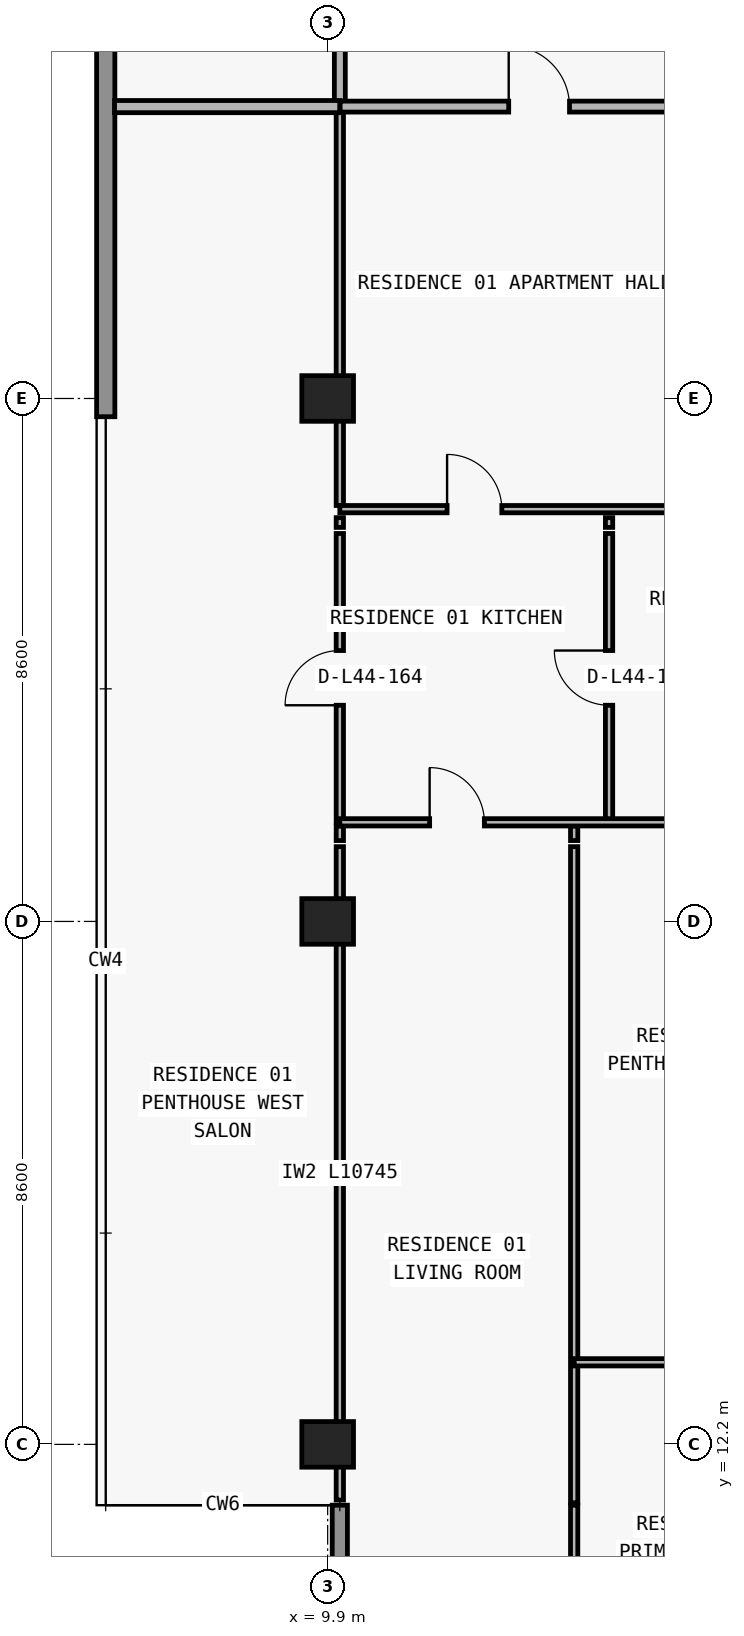
"""IFC4 building model, lengths in metres.
Left out: names, types, materials, properties, quantities, classifications, styles, units other than length and angle.
Written with IfcOpenShell. Run it as: python <this file> out.ifc"""

import sys

from ifc_helpers import new_model, si_unit, direction, frame, frame_2d, origin, origin_2d, place, context, subcontext, project, spatial, rectangle, extrude, element, fill, save


model = new_model("IFC4")
c1 = context("Model", 3, precision=1e-05, world=origin(), true_north=direction((0.0, 1.0)))
c2 = subcontext(c1, "Body", "Model", "MODEL_VIEW")
j1 = project(units=[si_unit("LENGTHUNIT", "METRE"), si_unit("PLANEANGLEUNIT", "RADIAN")], contexts=[c1])
p1 = place(None, origin())
s1 = spatial("IfcSite", under=j1, at=p1, CompositionType="ELEMENT")
p2 = place(p1, origin())
s2 = spatial("IfcBuilding", under=s1, at=p2, CompositionType="ELEMENT")
p3 = place(p2, frame((0.0, 0.0, 160.5)))
s3 = spatial("IfcBuildingStorey", under=s2, at=p3, CompositionType="ELEMENT", Elevation=160.5)
for number, where, z_axis, x_axis in (
    (1, (9.9, 12.2, 0.0), (0.0, 0.0, 1.0), (1.0, 0.0, 0.0)),
    (2, (9.9, 20.8, 0.0), (0.0, 0.0, 1.0), (1.0, 0.0, 0.0)),
    (3, (9.9, 29.4, 0.0), (0.0, 0.0, 1.0), (1.0, 0.0, 0.0)),
):
    element("IfcColumn", number, at=place(p3, frame(where, z_axis=z_axis, x_axis=x_axis)), inside=s3, PredefinedType="COLUMN", context=c2, shape_type="SweptSolid", body=[
        extrude(rectangle(XDim=0.85, YDim=0.75, at=origin_2d()), origin(), (0.0, 0.0, 1.0), 3.05),
    ])
p4 = place(p3, frame((10.1, 11.2, 0.0), z_axis=(0.0, 0.0, 1.0), x_axis=(0.0, -1.0, 0.0)))
e4 = element("IfcWall", 4, at=p4, inside=s3, PredefinedType="ELEMENTEDWALL", context=c2, shape_type="SweptSolid", body=[
    extrude(rectangle(XDim=3.45, YDim=0.25, at=frame_2d((1.725, 0.0))), origin(), (0.0, 0.0, 1.0), 3.05),
])
p5 = place(p3, frame((6.25, 29.1, 0.0), z_axis=(0.0, 0.0, 1.0), x_axis=(0.0, 1.0, 0.0)))
e5 = element("IfcWall", 5, at=p5, inside=s3, PredefinedType="STANDARD", context=c2, shape_type="SweptSolid", body=[
    extrude(rectangle(XDim=17.9, YDim=0.3, at=frame_2d((8.95, 0.0))), origin(), (0.0, 0.0, 1.0), 3.05),
])
p6 = place(p3, frame((10.1, 11.285, 0.0), z_axis=(0.0, 0.0, 1.0), x_axis=(0.0, 1.0, 0.0)))
e6 = element("IfcWall", 6, at=p6, inside=s3, PredefinedType="PARTITIONING", context=c2, shape_type="SweptSolid", body=[
    extrude(rectangle(XDim=10.745, YDim=0.12, at=frame_2d((5.373, 0.0))), origin(), (0.0, 0.0, 1.0), 2.263),
])
p7 = place(p3, frame((10.1, 22.13, 0.0), z_axis=(0.0, 0.0, 1.0), x_axis=(0.0, 1.0, 0.0)))
e7 = element("IfcWall", 7, at=p7, inside=s3, PredefinedType="PARTITIONING", context=c2, shape_type="SweptSolid", body=[
    extrude(rectangle(XDim=0.24, YDim=0.12, at=frame_2d((0.12, 0.0))), origin(), (0.0, 0.0, 1.0), 2.263),
])
p8 = place(p3, frame((10.1, 22.43, 0.0), z_axis=(0.0, 0.0, 1.0), x_axis=(0.0, 1.0, 0.0)))
e8 = element("IfcWall", 8, at=p8, inside=s3, PredefinedType="PARTITIONING", context=c2, shape_type="SweptSolid", body=[
    extrude(rectangle(XDim=4.75, YDim=0.12, at=frame_2d((2.375, 0.0))), origin(), (0.0, 0.0, 1.0), 2.263),
])
p9 = place(p8, frame((1.925, 0.0, 0.0)))
e9 = element("IfcOpeningElement", 9, at=p9, cuts=e8, PredefinedType="OPENING", context=c2, shape_type="SweptSolid", body=[
    extrude(rectangle(XDim=0.9, YDim=2.15, at=frame_2d((0.45, 1.075))), frame((0.0, 0.07, 0.0), z_axis=(0.0, -1.0, 0.0), x_axis=(1.0, 0.0, 0.0)), (0.0, 0.0, 1.0), 0.14),
])
p10 = place(p3, frame((10.1, 27.28, 0.0), z_axis=(0.0, 0.0, 1.0), x_axis=(0.0, 1.0, 0.0)))
e10 = element("IfcWall", 10, at=p10, inside=s3, PredefinedType="PARTITIONING", context=c2, shape_type="SweptSolid", body=[
    extrude(rectangle(XDim=0.16, YDim=0.12, at=frame_2d((0.08, 0.0))), origin(), (0.0, 0.0, 1.0), 2.263),
])
p11 = place(p3, frame((10.1, 27.64, 0.0), z_axis=(0.0, 0.0, 1.0), x_axis=(0.0, 1.0, 0.0)))
e11 = element("IfcWall", 11, at=p11, inside=s3, PredefinedType="PARTITIONING", context=c2, shape_type="SweptSolid", body=[
    extrude(rectangle(XDim=6.56, YDim=0.12, at=frame_2d((3.28, 0.0))), origin(), (0.0, 0.0, 1.0), 2.263),
])
p12 = place(p3, frame((10.1, 34.205, 0.0), z_axis=(0.0, 0.0, 1.0), x_axis=(0.0, 1.0, 0.0)))
e12 = element("IfcWall", 12, at=p12, inside=s3, PredefinedType="PARTITIONING", context=c2, shape_type="SweptSolid", body=[
    extrude(rectangle(XDim=2.745, YDim=0.18, at=frame_2d((1.373, 0.0))), origin(), (0.0, 0.0, 1.0), 2.263),
])
p13 = place(p3, frame((13.954, 7.895, 0.0), z_axis=(0.0, 0.0, 1.0), x_axis=(0.0, 1.0, 0.0)))
e13 = element("IfcWall", 13, at=p13, inside=s3, PredefinedType="PARTITIONING", context=c2, shape_type="SweptSolid", body=[
    extrude(rectangle(XDim=3.305, YDim=0.12, at=frame_2d((1.652, 0.0))), origin(), (0.0, 0.0, 1.0), 3.05),
])
p14 = place(p3, frame((13.954, 11.24, 0.0), z_axis=(0.0, 0.0, 1.0), x_axis=(0.0, 1.0, 0.0)))
e14 = element("IfcWall", 14, at=p14, inside=s3, PredefinedType="PARTITIONING", context=c2, shape_type="SweptSolid", body=[
    extrude(rectangle(XDim=10.79, YDim=0.12, at=frame_2d((5.395, 0.0))), origin(), (0.0, 0.0, 1.0), 3.05),
])
p15 = place(p3, frame((13.954, 22.13, 0.0), z_axis=(0.0, 0.0, 1.0), x_axis=(0.0, 1.0, 0.0)))
e15 = element("IfcWall", 15, at=p15, inside=s3, PredefinedType="PARTITIONING", context=c2, shape_type="SweptSolid", body=[
    extrude(rectangle(XDim=0.24, YDim=0.12, at=frame_2d((0.12, 0.0))), origin(), (0.0, 0.0, 1.0), 3.05),
])
p16 = place(p3, frame((14.528, 22.43, 0.0), z_axis=(0.0, 0.0, 1.0), x_axis=(0.0, 1.0, 0.0)))
e16 = element("IfcWall", 16, at=p16, inside=s3, PredefinedType="PARTITIONING", context=c2, shape_type="SweptSolid", body=[
    extrude(rectangle(XDim=4.75, YDim=0.12, at=frame_2d((2.375, 0.0))), origin(), (0.0, 0.0, 1.0), 3.05),
])
p17 = place(p16, frame((1.925, 0.0, 0.0)))
e17 = element("IfcOpeningElement", 17, at=p17, cuts=e16, PredefinedType="OPENING", context=c2, shape_type="SweptSolid", body=[
    extrude(rectangle(XDim=0.9, YDim=2.15, at=frame_2d((0.45, 1.075))), frame((0.0, 0.07, 0.0), z_axis=(0.0, -1.0, 0.0), x_axis=(1.0, 0.0, 0.0)), (0.0, 0.0, 1.0), 0.14),
])
p18 = place(p3, frame((14.528, 27.28, 0.0), z_axis=(0.0, 0.0, 1.0), x_axis=(0.0, 1.0, 0.0)))
e18 = element("IfcWall", 18, at=p18, inside=s3, PredefinedType="PARTITIONING", context=c2, shape_type="SweptSolid", body=[
    extrude(rectangle(XDim=0.16, YDim=0.12, at=frame_2d((0.08, 0.0))), origin(), (0.0, 0.0, 1.0), 3.05),
])
p19 = place(p3, frame((13.954, 13.55, 0.0), z_axis=(0.0, 0.0, 1.0), x_axis=(1.0, 0.0, 0.0)))
e19 = element("IfcWall", 19, at=p19, inside=s3, PredefinedType="PARTITIONING", context=c2, shape_type="SweptSolid", body=[
    extrude(rectangle(XDim=4.296, YDim=0.12, at=frame_2d((2.148, 0.0))), origin(), (0.0, 0.0, 1.0), 3.05),
])
p20 = place(p19, frame((1.698, 0.0, 0.0)))
e20 = element("IfcOpeningElement", 20, at=p20, cuts=e19, PredefinedType="OPENING", context=c2, shape_type="SweptSolid", body=[
    extrude(rectangle(XDim=0.9, YDim=2.15, at=frame_2d((0.45, 1.075))), frame((0.0, 0.07, 0.0), z_axis=(0.0, -1.0, 0.0), x_axis=(1.0, 0.0, 0.0)), (0.0, 0.0, 1.0), 0.14),
])
p21 = place(p3, frame((10.1, 22.43, 0.0), z_axis=(0.0, 0.0, 1.0), x_axis=(1.0, 0.0, 0.0)))
e21 = element("IfcWall", 21, at=p21, inside=s3, PredefinedType="PARTITIONING", context=c2, shape_type="SweptSolid", body=[
    extrude(rectangle(XDim=8.15, YDim=0.12, at=frame_2d((4.075, 0.0))), origin(), (0.0, 0.0, 1.0), 3.05),
])
p22 = place(p21, frame((1.477, 0.0, 0.0)))
e22 = element("IfcOpeningElement", 22, at=p22, cuts=e21, PredefinedType="OPENING", context=c2, shape_type="SweptSolid", body=[
    extrude(rectangle(XDim=0.9, YDim=2.15, at=frame_2d((0.45, 1.075))), frame((0.0, 0.07, 0.0), z_axis=(0.0, -1.0, 0.0), x_axis=(1.0, 0.0, 0.0)), (0.0, 0.0, 1.0), 0.14),
])
p23 = place(p21, frame((5.839, 0.0, 0.0)))
e23 = element("IfcOpeningElement", 23, at=p23, cuts=e21, PredefinedType="OPENING", context=c2, shape_type="SweptSolid", body=[
    extrude(rectangle(XDim=0.9, YDim=2.15, at=frame_2d((0.45, 1.075))), frame((0.0, 0.07, 0.0), z_axis=(0.0, -1.0, 0.0), x_axis=(1.0, 0.0, 0.0)), (0.0, 0.0, 1.0), 0.14),
])
p24 = place(p3, frame((10.1, 27.58, 0.0), z_axis=(0.0, 0.0, 1.0), x_axis=(1.0, 0.0, 0.0)))
e24 = element("IfcWall", 24, at=p24, inside=s3, PredefinedType="PARTITIONING", context=c2, shape_type="SweptSolid", body=[
    extrude(rectangle(XDim=8.15, YDim=0.12, at=frame_2d((4.075, 0.0))), origin(), (0.0, 0.0, 1.0), 3.05),
])
p25 = place(p24, frame((1.764, 0.0, 0.0)))
e25 = element("IfcOpeningElement", 25, at=p25, cuts=e24, PredefinedType="OPENING", context=c2, shape_type="SweptSolid", body=[
    extrude(rectangle(XDim=0.9, YDim=2.15, at=frame_2d((0.45, 1.075))), frame((0.0, 0.07, 0.0), z_axis=(0.0, -1.0, 0.0), x_axis=(1.0, 0.0, 0.0)), (0.0, 0.0, 1.0), 0.14),
])
p26 = place(p3, frame((6.395, 34.2, 0.0), z_axis=(0.0, 0.0, 1.0), x_axis=(1.0, 0.0, 0.0)))
e26 = element("IfcWall", 26, at=p26, inside=s3, PredefinedType="PARTITIONING", context=c2, shape_type="SweptSolid", body=[
    extrude(rectangle(XDim=3.705, YDim=0.2, at=frame_2d((1.853, 0.0))), origin(), (0.0, 0.0, 1.0), 3.05),
])
p27 = place(p3, frame((10.105, 34.2, 0.0), z_axis=(0.0, 0.0, 1.0), x_axis=(1.0, 0.0, 0.0)))
e27 = element("IfcWall", 27, at=p27, inside=s3, PredefinedType="PARTITIONING", context=c2, shape_type="SweptSolid", body=[
    extrude(rectangle(XDim=8.145, YDim=0.18, at=frame_2d((4.073, 0.0))), origin(), (0.0, 0.0, 1.0), 3.05),
])
p28 = place(p27, frame((2.772, 0.0, 0.0)))
e28 = element("IfcOpeningElement", 28, at=p28, cuts=e27, PredefinedType="OPENING", context=c2, shape_type="SweptSolid", body=[
    extrude(rectangle(XDim=1.0, YDim=2.2, at=frame_2d((0.5, 1.1))), frame((0.0, 0.1, 0.0), z_axis=(0.0, -1.0, 0.0), x_axis=(1.0, 0.0, 0.0)), (0.0, 0.0, 1.0), 0.2),
])
p29 = place(p28, origin())
e29 = element("IfcDoor", 29, at=p29, inside=s3, OperationType="SINGLE_SWING_LEFT", PredefinedType="DOOR", context=c2, shape_type="SweptSolid", body=[
    extrude(rectangle(XDim=1.0, YDim=2.2, at=frame_2d((0.5, 1.1))), frame((0.0, 0.025, 0.0), z_axis=(0.0, -1.0, 0.0), x_axis=(1.0, 0.0, 0.0)), (0.0, 0.0, 1.0), 0.05),
])
fill(e28, e29)
p30 = place(p25, origin())
e30 = element("IfcDoor", 30, at=p30, inside=s3, OperationType="SINGLE_SWING_LEFT", PredefinedType="DOOR", context=c2, shape_type="SweptSolid", body=[
    extrude(rectangle(XDim=0.9, YDim=2.15, at=frame_2d((0.45, 1.075))), frame((0.0, 0.025, 0.0), z_axis=(0.0, -1.0, 0.0), x_axis=(1.0, 0.0, 0.0)), (0.0, 0.0, 1.0), 0.05),
])
fill(e25, e30)
p31 = place(p17, origin())
e31 = element("IfcDoor", 31, at=p31, inside=s3, OperationType="SINGLE_SWING_RIGHT", PredefinedType="DOOR", context=c2, shape_type="SweptSolid", body=[
    extrude(rectangle(XDim=0.9, YDim=2.15, at=frame_2d((0.45, 1.075))), frame((0.0, 0.025, 0.0), z_axis=(0.0, -1.0, 0.0), x_axis=(1.0, 0.0, 0.0)), (0.0, 0.0, 1.0), 0.05),
])
fill(e17, e31)
p32 = place(p22, origin())
e32 = element("IfcDoor", 32, at=p32, inside=s3, OperationType="SINGLE_SWING_LEFT", PredefinedType="DOOR", context=c2, shape_type="SweptSolid", body=[
    extrude(rectangle(XDim=0.9, YDim=2.15, at=frame_2d((0.45, 1.075))), frame((0.0, 0.025, 0.0), z_axis=(0.0, -1.0, 0.0), x_axis=(1.0, 0.0, 0.0)), (0.0, 0.0, 1.0), 0.05),
])
fill(e22, e32)
p33 = place(p9, origin())
e33 = element("IfcDoor", 33, at=p33, inside=s3, OperationType="SINGLE_SWING_LEFT", PredefinedType="DOOR", context=c2, shape_type="SweptSolid", body=[
    extrude(rectangle(XDim=0.9, YDim=2.15, at=frame_2d((0.45, 1.075))), frame((0.0, 0.025, 0.0), z_axis=(0.0, -1.0, 0.0), x_axis=(1.0, 0.0, 0.0)), (0.0, 0.0, 1.0), 0.05),
])
fill(e9, e33)
save(model, sys.argv[1])
